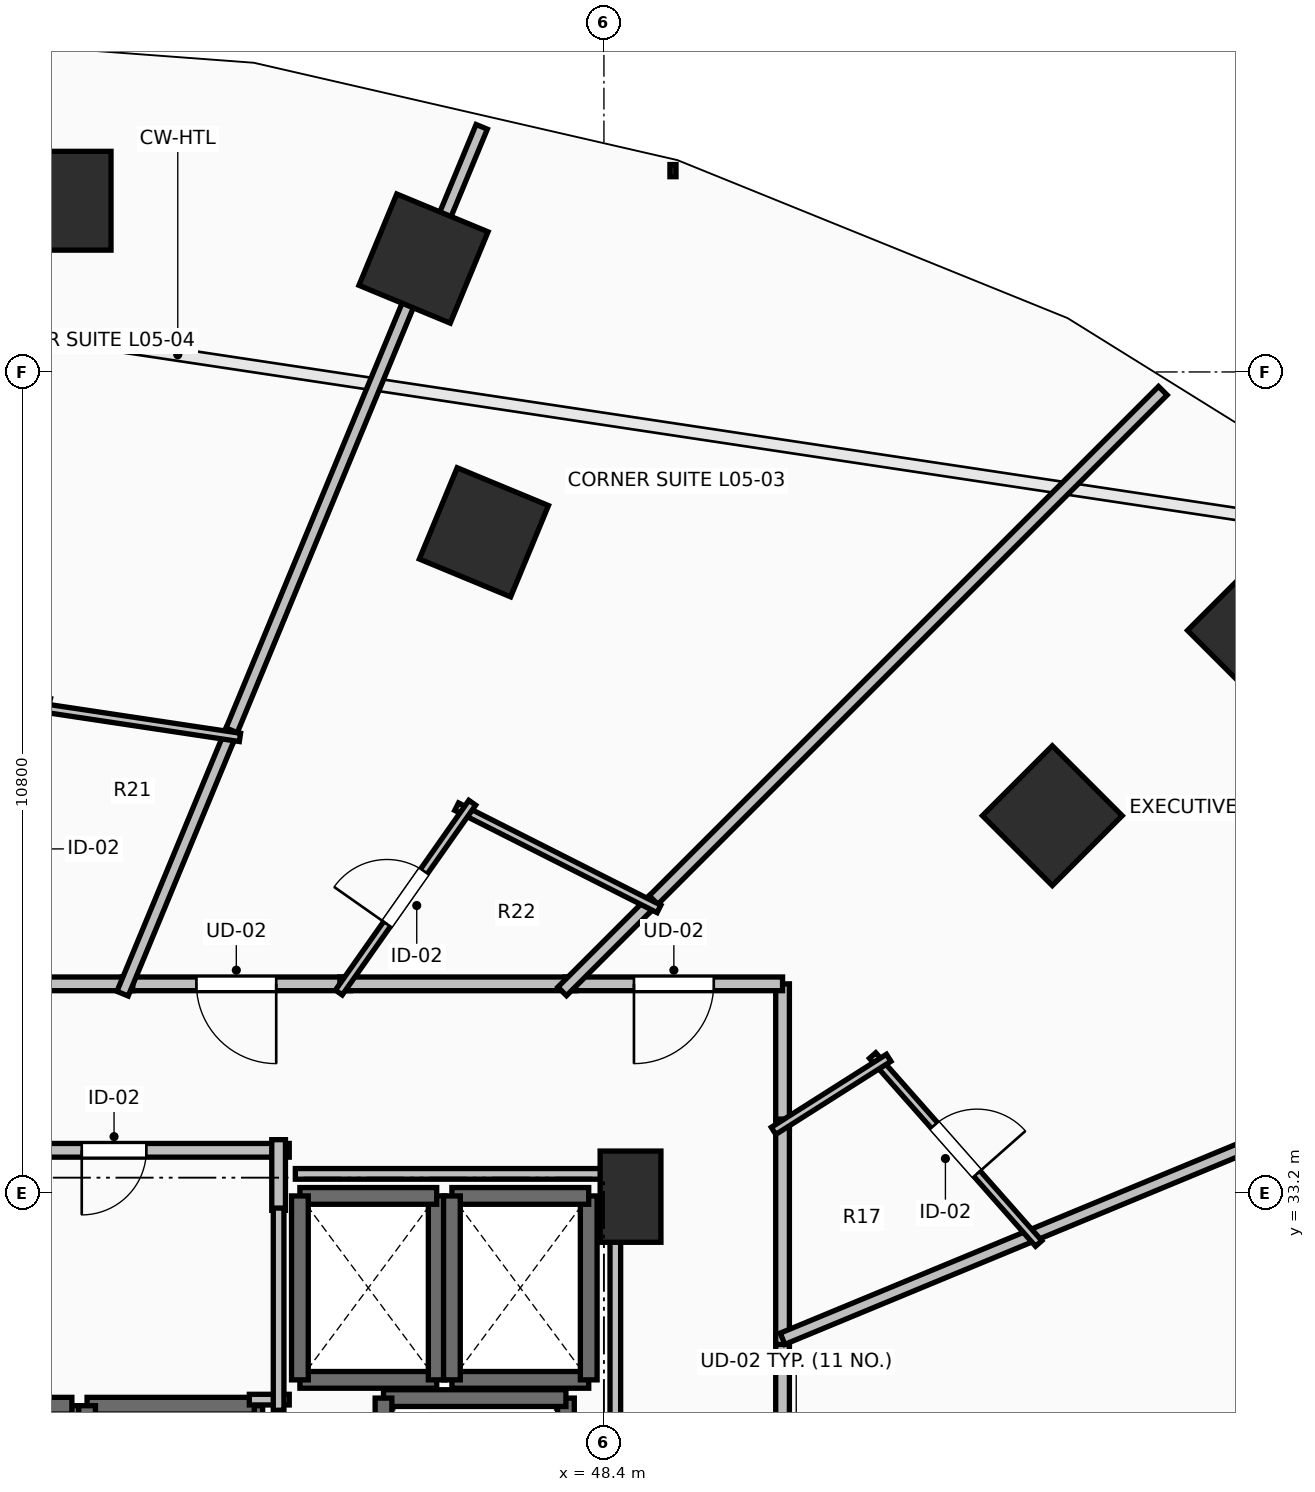
"""IFC4 building model, lengths in metres.
Left out: names, types, materials, properties, quantities, classifications, styles, units other than length and angle.
Written with IfcOpenShell. Run it as: python <this file> out.ifc"""

import sys

from ifc_helpers import new_model, si_unit, direction, frame, frame_2d, origin, origin_2d, place, context, subcontext, project, spatial, rectangle, extrude, element, fill, save


model = new_model("IFC4")
c1 = context("Model", 3, precision=1e-05, world=origin(), true_north=direction((0.0, 1.0)))
c2 = subcontext(c1, "Body", "Model", "MODEL_VIEW")
j1 = project(units=[si_unit("LENGTHUNIT", "METRE"), si_unit("PLANEANGLEUNIT", "RADIAN")], contexts=[c1])
p1 = place(None, origin())
s1 = spatial("IfcSite", under=j1, at=p1, CompositionType="ELEMENT")
p2 = place(p1, origin())
s2 = spatial("IfcBuilding", under=s1, at=p2, CompositionType="ELEMENT")
p3 = place(p2, frame((0.0, 0.0, 24.0)))
s3 = spatial("IfcBuildingStorey", under=s2, at=p3, CompositionType="ELEMENT", Elevation=24.0)
for number, where, z_axis, x_axis in (
    (1, (54.299, 38.162, 0.0), (0.0, 0.0, 1.0), (0.707, 0.707, 0.0)),
    (2, (46.821, 41.891, 0.0), (0.0, 0.0, 1.0), (0.383, 0.924, 0.0)),
    (3, (56.997, 40.6, 0.0), (0.0, 0.0, 1.0), (0.707, 0.707, 0.0)),
    (4, (46.026, 45.492, 0.0), (0.0, 0.0, 1.0), (0.383, 0.924, 0.0)),
    (5, (41.265, 46.252, 0.0), (0.0, 0.0, 1.0), (0.0, 1.0, 0.0)),
):
    element("IfcColumn", number, at=place(p3, frame(where, z_axis=z_axis, x_axis=x_axis)), inside=s3, PredefinedType="COLUMN", context=c2, shape_type="SweptSolid", body=[
        extrude(rectangle(XDim=1.3, YDim=1.3, at=origin_2d()), origin(), (0.0, 0.0, 1.0), 3.5),
    ])
p4 = place(p3, frame((48.75, 33.15, 0.0), z_axis=(0.0, 0.0, 1.0), x_axis=(1.0, 0.0, 0.0)))
e6 = element("IfcColumn", 6, at=p4, inside=s3, PredefinedType="PILASTER", context=c2, shape_type="SweptSolid", body=[
    extrude(rectangle(XDim=0.8, YDim=1.2, at=origin_2d()), origin(), (0.0, 0.0, 1.0), 3.5),
])
p5 = place(p3, frame((41.4, 27.8, 0.0), z_axis=(0.0, 0.0, 1.0), x_axis=(0.0, 1.0, 0.0)))
e7 = element("IfcWall", 7, at=p5, inside=s3, PredefinedType="SOLIDWALL", context=c2, shape_type="SweptSolid", body=[
    extrude(rectangle(XDim=2.6, YDim=0.22, at=frame_2d((1.3, 0.0))), origin(), (0.0, 0.0, 1.0), 3.24),
])
p6 = place(p3, frame((41.4, 30.4, 0.0), z_axis=(0.0, 0.0, 1.0), x_axis=(-1.0, 0.0, 0.0)))
e8 = element("IfcWall", 8, at=p6, inside=s3, PredefinedType="SOLIDWALL", context=c2, shape_type="SweptSolid", body=[
    extrude(rectangle(XDim=2.2, YDim=0.22, at=frame_2d((1.1, 0.0))), origin(), (0.0, 0.0, 1.0), 3.24),
])
p7 = place(p3, frame((43.8, 27.8, 0.0), z_axis=(0.0, 0.0, 1.0), x_axis=(0.0, 1.0, 0.0)))
e9 = element("IfcWall", 9, at=p7, inside=s3, PredefinedType="SOLIDWALL", context=c2, shape_type="SweptSolid", body=[
    extrude(rectangle(XDim=2.6, YDim=0.22, at=frame_2d((1.3, 0.0))), origin(), (0.0, 0.0, 1.0), 3.24),
])
p8 = place(p3, frame((43.8, 30.4, 0.0), z_axis=(0.0, 0.0, 1.0), x_axis=(-1.0, 0.0, 0.0)))
e10 = element("IfcWall", 10, at=p8, inside=s3, PredefinedType="SOLIDWALL", context=c2, shape_type="SweptSolid", body=[
    extrude(rectangle(XDim=2.2, YDim=0.22, at=frame_2d((1.1, 0.0))), origin(), (0.0, 0.0, 1.0), 3.24),
])
p9 = place(p3, frame((41.6, 30.4, 0.0), z_axis=(0.0, 0.0, 1.0), x_axis=(0.0, -1.0, 0.0)))
e11 = element("IfcWall", 11, at=p9, inside=s3, PredefinedType="SOLIDWALL", context=c2, shape_type="SweptSolid", body=[
    extrude(rectangle(XDim=2.6, YDim=0.22, at=frame_2d((1.3, 0.0))), origin(), (0.0, 0.0, 1.0), 3.24),
])
p10 = place(p3, frame((44.4, 30.74, 0.0), z_axis=(0.0, 0.0, 1.0), x_axis=(1.0, 0.0, 0.0)))
e12 = element("IfcWall", 12, at=p10, inside=s3, PredefinedType="SOLIDWALL", context=c2, shape_type="SweptSolid", body=[
    extrude(rectangle(XDim=1.8, YDim=0.22, at=frame_2d((0.9, 0.0))), origin(), (0.0, 0.0, 1.0), 3.24),
])
p11 = place(p3, frame((46.2, 30.74, 0.0), z_axis=(0.0, 0.0, 1.0), x_axis=(0.0, 1.0, 0.0)))
e13 = element("IfcWall", 13, at=p11, inside=s3, PredefinedType="SOLIDWALL", context=c2, shape_type="SweptSolid", body=[
    extrude(rectangle(XDim=2.42, YDim=0.22, at=frame_2d((1.21, 0.0))), origin(), (0.0, 0.0, 1.0), 3.24),
])
p12 = place(p3, frame((46.2, 33.16, 0.0), z_axis=(0.0, 0.0, 1.0), x_axis=(-1.0, 0.0, 0.0)))
e14 = element("IfcWall", 14, at=p12, inside=s3, PredefinedType="SOLIDWALL", context=c2, shape_type="SweptSolid", body=[
    extrude(rectangle(XDim=1.8, YDim=0.22, at=frame_2d((0.9, 0.0))), origin(), (0.0, 0.0, 1.0), 3.24),
])
p13 = place(p3, frame((44.4, 33.16, 0.0), z_axis=(0.0, 0.0, 1.0), x_axis=(0.0, -1.0, 0.0)))
e15 = element("IfcWall", 15, at=p13, inside=s3, PredefinedType="SOLIDWALL", context=c2, shape_type="SweptSolid", body=[
    extrude(rectangle(XDim=2.42, YDim=0.22, at=frame_2d((1.21, 0.0))), origin(), (0.0, 0.0, 1.0), 3.24),
])
p14 = place(p3, frame((46.4, 30.74, 0.0), z_axis=(0.0, 0.0, 1.0), x_axis=(1.0, 0.0, 0.0)))
e16 = element("IfcWall", 16, at=p14, inside=s3, PredefinedType="SOLIDWALL", context=c2, shape_type="SweptSolid", body=[
    extrude(rectangle(XDim=1.8, YDim=0.22, at=frame_2d((0.9, 0.0))), origin(), (0.0, 0.0, 1.0), 3.24),
])
p15 = place(p3, frame((48.2, 30.74, 0.0), z_axis=(0.0, 0.0, 1.0), x_axis=(0.0, 1.0, 0.0)))
e17 = element("IfcWall", 17, at=p15, inside=s3, PredefinedType="SOLIDWALL", context=c2, shape_type="SweptSolid", body=[
    extrude(rectangle(XDim=2.42, YDim=0.22, at=frame_2d((1.21, 0.0))), origin(), (0.0, 0.0, 1.0), 3.24),
])
p16 = place(p3, frame((48.2, 33.16, 0.0), z_axis=(0.0, 0.0, 1.0), x_axis=(-1.0, 0.0, 0.0)))
e18 = element("IfcWall", 18, at=p16, inside=s3, PredefinedType="SOLIDWALL", context=c2, shape_type="SweptSolid", body=[
    extrude(rectangle(XDim=1.8, YDim=0.22, at=frame_2d((0.9, 0.0))), origin(), (0.0, 0.0, 1.0), 3.24),
])
p17 = place(p3, frame((46.4, 33.16, 0.0), z_axis=(0.0, 0.0, 1.0), x_axis=(0.0, -1.0, 0.0)))
e19 = element("IfcWall", 19, at=p17, inside=s3, PredefinedType="SOLIDWALL", context=c2, shape_type="SweptSolid", body=[
    extrude(rectangle(XDim=2.42, YDim=0.22, at=frame_2d((1.21, 0.0))), origin(), (0.0, 0.0, 1.0), 3.24),
])
p18 = place(p3, frame((47.9, 28.0, 0.0), z_axis=(0.0, 0.0, 1.0), x_axis=(0.0, 1.0, 0.0)))
e20 = element("IfcWall", 20, at=p18, inside=s3, PredefinedType="SHEAR", context=c2, shape_type="SweptSolid", body=[
    extrude(rectangle(XDim=2.5, YDim=0.22, at=frame_2d((1.25, 0.0))), origin(), (0.0, 0.0, 1.0), 3.24),
])
p19 = place(p3, frame((47.9, 30.5, 0.0), z_axis=(0.0, 0.0, 1.0), x_axis=(-1.0, 0.0, 0.0)))
e21 = element("IfcWall", 21, at=p19, inside=s3, PredefinedType="SHEAR", context=c2, shape_type="SweptSolid", body=[
    extrude(rectangle(XDim=2.4, YDim=0.22, at=frame_2d((1.2, 0.0))), origin(), (0.0, 0.0, 1.0), 3.24),
])
p20 = place(p3, frame((45.5, 30.5, 0.0), z_axis=(0.0, 0.0, 1.0), x_axis=(0.0, -1.0, 0.0)))
e22 = element("IfcWall", 22, at=p20, inside=s3, PredefinedType="SHEAR", context=c2, shape_type="SweptSolid", body=[
    extrude(rectangle(XDim=2.5, YDim=0.22, at=frame_2d((1.25, 0.0))), origin(), (0.0, 0.0, 1.0), 3.24),
])
p21 = place(p3, frame((44.26, 33.76, 0.0), z_axis=(0.0, 0.0, 1.0), x_axis=(-1.0, 0.0, 0.0)))
e23 = element("IfcWall", 23, at=p21, inside=s3, PredefinedType="PARTITIONING", context=c2, shape_type="SweptSolid", body=[
    extrude(rectangle(XDim=4.61, YDim=0.18, at=frame_2d((2.305, 0.0))), origin(), (0.0, 0.0, 1.0), 3.24),
])
p22 = place(p21, frame((1.88, 0.0, 0.0)))
e24 = element("IfcOpeningElement", 24, at=p22, cuts=e23, PredefinedType="OPENING", context=c2, shape_type="SweptSolid", body=[
    extrude(rectangle(XDim=0.85, YDim=2.1, at=frame_2d((0.425, 1.05))), frame((0.0, 0.105, 0.0), z_axis=(0.0, -1.0, 0.0), x_axis=(1.0, 0.0, 0.0)), (0.0, 0.0, 1.0), 0.21),
])
p23 = place(p3, frame((44.12, 32.97, 0.0), z_axis=(0.0, 0.0, 1.0), x_axis=(0.0, 1.0, 0.0)))
e25 = element("IfcWall", 25, at=p23, inside=s3, PredefinedType="PARTITIONING", context=c2, shape_type="SweptSolid", body=[
    extrude(rectangle(XDim=0.93, YDim=0.18, at=frame_2d((0.465, 0.0))), origin(), (0.0, 0.0, 1.0), 3.24),
])
p24 = place(p3, frame((50.75, 28.165, 0.0), z_axis=(0.0, 0.0, 1.0), x_axis=(0.0, 1.0, 0.0)))
e26 = element("IfcWall", 26, at=p24, inside=s3, PredefinedType="PARTITIONING", context=c2, shape_type="SweptSolid", body=[
    extrude(rectangle(XDim=3.181, YDim=0.18, at=frame_2d((1.59, 0.0))), origin(), (0.0, 0.0, 1.0), 3.24),
])
p25 = place(p24, frame((1.065, 0.0, 0.0)))
e27 = element("IfcOpeningElement", 27, at=p25, cuts=e26, PredefinedType="OPENING", context=c2, shape_type="SweptSolid", body=[
    extrude(rectangle(XDim=1.05, YDim=2.2, at=frame_2d((0.525, 1.1))), frame((0.0, 0.105, 0.0), z_axis=(0.0, -1.0, 0.0), x_axis=(1.0, 0.0, 0.0)), (0.0, 0.0, 1.0), 0.21),
])
p26 = place(p3, frame((50.75, 34.031, 0.0), z_axis=(0.0, 0.0, 1.0), x_axis=(0.0, 1.0, 0.0)))
e28 = element("IfcWall", 28, at=p26, inside=s3, PredefinedType="PARTITIONING", context=c2, shape_type="SweptSolid", body=[
    extrude(rectangle(XDim=1.919, YDim=0.18, at=frame_2d((0.959, 0.0))), origin(), (0.0, 0.0, 1.0), 2.432),
])
p27 = place(p3, frame((50.75, 35.95, 0.0), z_axis=(0.0, 0.0, 1.0), x_axis=(-1.0, 0.0, 0.0)))
e29 = element("IfcWall", 29, at=p27, inside=s3, PredefinedType="PARTITIONING", context=c2, shape_type="SweptSolid", body=[
    extrude(rectangle(XDim=2.86, YDim=0.18, at=frame_2d((1.43, 0.0))), origin(), (0.0, 0.0, 1.0), 2.432),
])
p28 = place(p27, frame((0.905, 0.0, 0.0)))
e30 = element("IfcOpeningElement", 30, at=p28, cuts=e29, PredefinedType="OPENING", context=c2, shape_type="SweptSolid", body=[
    extrude(rectangle(XDim=1.05, YDim=2.2, at=frame_2d((0.525, 1.1))), frame((0.0, 0.105, 0.0), z_axis=(0.0, -1.0, 0.0), x_axis=(1.0, 0.0, 0.0)), (0.0, 0.0, 1.0), 0.21),
])
p29 = place(p3, frame((50.75, 31.206, 0.0), z_axis=(0.0, 0.0, 1.0), x_axis=(0.0, 1.0, 0.0)))
e31 = element("IfcWall", 31, at=p29, inside=s3, PredefinedType="PARTITIONING", context=c2, shape_type="SweptSolid", body=[
    extrude(rectangle(XDim=2.965, YDim=0.18, at=frame_2d((1.482, 0.0))), origin(), (0.0, 0.0, 1.0), 2.432),
])
p30 = place(p3, frame((45.066, 35.95, 0.0), z_axis=(0.0, 0.0, 1.0), x_axis=(-1.0, 0.0, 0.0)))
e32 = element("IfcWall", 32, at=p30, inside=s3, PredefinedType="PARTITIONING", context=c2, shape_type="SweptSolid", body=[
    extrude(rectangle(XDim=3.005, YDim=0.18, at=frame_2d((1.502, 0.0))), origin(), (0.0, 0.0, 1.0), 3.24),
])
p31 = place(p30, frame((0.978, 0.0, 0.0)))
e33 = element("IfcOpeningElement", 33, at=p31, cuts=e32, PredefinedType="OPENING", context=c2, shape_type="SweptSolid", body=[
    extrude(rectangle(XDim=1.05, YDim=2.2, at=frame_2d((0.525, 1.1))), frame((0.0, 0.105, 0.0), z_axis=(0.0, -1.0, 0.0), x_axis=(1.0, 0.0, 0.0)), (0.0, 0.0, 1.0), 0.21),
])
p32 = place(p3, frame((48.03, 35.95, 0.0), z_axis=(0.0, 0.0, 1.0), x_axis=(-1.0, 0.0, 0.0)))
e34 = element("IfcWall", 34, at=p32, inside=s3, PredefinedType="PARTITIONING", context=c2, shape_type="SweptSolid", body=[
    extrude(rectangle(XDim=3.104, YDim=0.18, at=frame_2d((1.552, 0.0))), origin(), (0.0, 0.0, 1.0), 2.432),
])
p33 = place(p3, frame((42.201, 35.95, 0.0), z_axis=(0.0, 0.0, 1.0), x_axis=(-1.0, 0.0, 0.0)))
e35 = element("IfcWall", 35, at=p33, inside=s3, PredefinedType="PARTITIONING", context=c2, shape_type="SweptSolid", body=[
    extrude(rectangle(XDim=2.056, YDim=0.18, at=frame_2d((1.028, 0.0))), origin(), (0.0, 0.0, 1.0), 3.24),
])
p34 = place(p3, frame((63.793, 36.684, 0.0), z_axis=(0.0, 0.0, 1.0), x_axis=(-0.923866969846, -0.382713759914, 0.0)))
e36 = element("IfcWall", 36, at=p34, inside=s3, PredefinedType="PARTITIONING", context=c2, shape_type="SweptSolid", body=[
    extrude(rectangle(XDim=14.118, YDim=0.16, at=frame_2d((7.059, 0.0))), origin(), (0.0, 0.0, 1.0), 2.432),
])
p35 = place(p3, frame((51.935, 35.007, 0.0), z_axis=(0.0, 0.0, 1.0), x_axis=(0.662059609276, -0.749451181709, 0.0)))
e37 = element("IfcWall", 37, at=p35, inside=s3, PredefinedType="PARTITIONING", context=c2, shape_type="SweptSolid", body=[
    extrude(rectangle(XDim=3.299, YDim=0.11, at=frame_2d((1.65, 0.0))), origin(), (0.0, 0.0, 1.0), 2.432),
])
p36 = place(p35, frame((1.225, 0.0, 0.0)))
e38 = element("IfcOpeningElement", 38, at=p36, cuts=e37, PredefinedType="OPENING", context=c2, shape_type="SweptSolid", body=[
    extrude(rectangle(XDim=0.85, YDim=2.1, at=frame_2d((0.425, 1.05))), frame((0.0, 0.07, 0.0), z_axis=(0.0, -1.0, 0.0), x_axis=(1.0, 0.0, 0.0)), (0.0, 0.0, 1.0), 0.14),
])
p37 = place(p3, frame((50.632, 34.016, 0.0), z_axis=(0.0, 0.0, 1.0), x_axis=(0.844361394482, 0.535774052665, 0.0)))
e39 = element("IfcWall", 39, at=p37, inside=s3, PredefinedType="PARTITIONING", context=c2, shape_type="SweptSolid", body=[
    extrude(rectangle(XDim=1.793, YDim=0.11, at=frame_2d((0.897, 0.0))), origin(), (0.0, 0.0, 1.0), 2.922),
])
p38 = place(p3, frame((55.753, 43.753, 0.0), z_axis=(0.0, 0.0, 1.0), x_axis=(-0.707106781187, -0.707106781187, 0.0)))
e40 = element("IfcWall", 40, at=p38, inside=s3, PredefinedType="PARTITIONING", context=c2, shape_type="SweptSolid", body=[
    extrude(rectangle(XDim=9.615, YDim=0.16, at=frame_2d((4.808, 0.0))), origin(), (0.0, 0.0, 1.0), 2.624),
])
p39 = place(p3, frame((49.053, 37.053, 0.0), z_axis=(0.0, 0.0, 1.0), x_axis=(-0.707106781187, -0.707106781187, 0.0)))
e41 = element("IfcWall", 41, at=p39, inside=s3, PredefinedType="PARTITIONING", context=c2, shape_type="SweptSolid", body=[
    extrude(rectangle(XDim=1.7, YDim=0.16, at=frame_2d((0.85, 0.0))), origin(), (0.0, 0.0, 1.0), 2.432),
])
p40 = place(p3, frame((46.462, 38.281, 0.0), z_axis=(0.0, 0.0, 1.0), x_axis=(0.892486842203, -0.451073426944, 0.0)))
e42 = element("IfcWall", 42, at=p40, inside=s3, PredefinedType="PARTITIONING", context=c2, shape_type="SweptSolid", body=[
    extrude(rectangle(XDim=2.982, YDim=0.11, at=frame_2d((1.491, 0.0))), origin(), (0.0, 0.0, 1.0), 2.432),
])
p41 = place(p3, frame((44.913, 35.835, 0.0), z_axis=(0.0, 0.0, 1.0), x_axis=(0.574986040322, 0.818163219312, 0.0)))
e43 = element("IfcWall", 43, at=p41, inside=s3, PredefinedType="PARTITIONING", context=c2, shape_type="SweptSolid", body=[
    extrude(rectangle(XDim=3.052, YDim=0.11, at=frame_2d((1.526, 0.0))), origin(), (0.0, 0.0, 1.0), 2.922),
])
p42 = place(p41, frame((1.101, 0.0, 0.0)))
e44 = element("IfcOpeningElement", 44, at=p42, cuts=e43, PredefinedType="OPENING", context=c2, shape_type="SweptSolid", body=[
    extrude(rectangle(XDim=0.85, YDim=2.1, at=frame_2d((0.425, 1.05))), frame((0.0, 0.07, 0.0), z_axis=(0.0, -1.0, 0.0), x_axis=(1.0, 0.0, 0.0)), (0.0, 0.0, 1.0), 0.14),
])
p43 = place(p3, frame((46.792, 47.225, 0.0), z_axis=(0.0, 0.0, 1.0), x_axis=(-0.382750893248, -0.923851586413, 0.0)))
e45 = element("IfcWall", 45, at=p43, inside=s3, PredefinedType="PARTITIONING", context=c2, shape_type="SweptSolid", body=[
    extrude(rectangle(XDim=8.734, YDim=0.16, at=frame_2d((4.367, 0.0))), origin(), (0.0, 0.0, 1.0), 2.874),
])
p44 = place(p3, frame((43.503, 39.285, 0.0), z_axis=(0.0, 0.0, 1.0), x_axis=(-0.382867331148, -0.923803337697, 0.0)))
e46 = element("IfcWall", 46, at=p44, inside=s3, PredefinedType="PARTITIONING", context=c2, shape_type="SweptSolid", body=[
    extrude(rectangle(XDim=3.75, YDim=0.16, at=frame_2d((1.875, 0.0))), origin(), (0.0, 0.0, 1.0), 2.922),
])
p45 = place(p3, frame((40.896, 39.6, 0.0), z_axis=(0.0, 0.0, 1.0), x_axis=(0.98891024541, -0.148514398367, 0.0)))
e47 = element("IfcWall", 47, at=p45, inside=s3, PredefinedType="PARTITIONING", context=c2, shape_type="SweptSolid", body=[
    extrude(rectangle(XDim=2.745, YDim=0.11, at=frame_2d((1.373, 0.0))), origin(), (0.0, 0.0, 1.0), 3.24),
])
p46 = place(p3, frame((43.735, 30.48, 0.0), z_axis=(0.0, 0.0, 1.0), x_axis=(1.0, 0.0, 0.0)))
e48 = element("IfcWall", 48, at=p46, inside=s3, PredefinedType="PARTITIONING", context=c2, shape_type="SweptSolid", body=[
    extrude(rectangle(XDim=0.525, YDim=0.14, at=frame_2d((0.262, 0.0))), origin(), (0.0, 0.0, 1.0), 3.24),
])
p47 = place(p3, frame((44.12, 30.34, 0.0), z_axis=(0.0, 0.0, 1.0), x_axis=(0.0, 1.0, 0.0)))
e49 = element("IfcWall", 49, at=p47, inside=s3, PredefinedType="PARTITIONING", context=c2, shape_type="SweptSolid", body=[
    extrude(rectangle(XDim=2.66, YDim=0.14, at=frame_2d((1.33, 0.0))), origin(), (0.0, 0.0, 1.0), 3.24),
])
p48 = place(p3, frame((44.34, 33.45, 0.0), z_axis=(0.0, 0.0, 1.0), x_axis=(1.0, 0.0, 0.0)))
e50 = element("IfcWall", 50, at=p48, inside=s3, PredefinedType="PARTITIONING", context=c2, shape_type="SweptSolid", body=[
    extrude(rectangle(XDim=4.21, YDim=0.14, at=frame_2d((2.105, 0.0))), origin(), (0.0, 0.0, 1.0), 2.432),
])
p49 = place(p3, frame((48.55, 33.45, 0.0), z_axis=(0.0, 0.0, 1.0), x_axis=(0.0, -1.0, 0.0)))
e51 = element("IfcWall", 51, at=p49, inside=s3, PredefinedType="PARTITIONING", context=c2, shape_type="SweptSolid", body=[
    extrude(rectangle(XDim=5.254, YDim=0.14, at=frame_2d((2.627, 0.0))), origin(), (0.0, 0.0, 1.0), 2.432),
])
p50 = place(p22, origin())
e52 = element("IfcDoor", 52, at=p50, inside=s3, OperationType="SINGLE_SWING_RIGHT", PredefinedType="DOOR", context=c2, shape_type="SweptSolid", body=[
    extrude(rectangle(XDim=0.85, YDim=2.1, at=frame_2d((0.425, 1.05))), frame((0.0, 0.025, 0.0), z_axis=(0.0, -1.0, 0.0), x_axis=(1.0, 0.0, 0.0)), (0.0, 0.0, 1.0), 0.05),
])
fill(e24, e52)
p51 = place(p28, origin())
e53 = element("IfcDoor", 53, at=p51, inside=s3, OperationType="SINGLE_SWING_RIGHT", PredefinedType="DOOR", context=c2, shape_type="SweptSolid", body=[
    extrude(rectangle(XDim=1.05, YDim=2.2, at=frame_2d((0.525, 1.1))), frame((0.0, 0.025, 0.0), z_axis=(0.0, -1.0, 0.0), x_axis=(1.0, 0.0, 0.0)), (0.0, 0.0, 1.0), 0.05),
])
fill(e30, e53)
p52 = place(p31, origin())
e54 = element("IfcDoor", 54, at=p52, inside=s3, OperationType="SINGLE_SWING_LEFT", PredefinedType="DOOR", context=c2, shape_type="SweptSolid", body=[
    extrude(rectangle(XDim=1.05, YDim=2.2, at=frame_2d((0.525, 1.1))), frame((0.0, 0.025, 0.0), z_axis=(0.0, -1.0, 0.0), x_axis=(1.0, 0.0, 0.0)), (0.0, 0.0, 1.0), 0.05),
])
fill(e33, e54)
p53 = place(p36, origin())
e55 = element("IfcDoor", 55, at=p53, inside=s3, OperationType="SINGLE_SWING_RIGHT", PredefinedType="DOOR", context=c2, shape_type="SweptSolid", body=[
    extrude(rectangle(XDim=0.85, YDim=2.1, at=frame_2d((0.425, 1.05))), frame((0.0, 0.025, 0.0), z_axis=(0.0, -1.0, 0.0), x_axis=(1.0, 0.0, 0.0)), (0.0, 0.0, 1.0), 0.05),
])
fill(e38, e55)
p54 = place(p42, origin())
e56 = element("IfcDoor", 56, at=p54, inside=s3, OperationType="SINGLE_SWING_LEFT", PredefinedType="DOOR", context=c2, shape_type="SweptSolid", body=[
    extrude(rectangle(XDim=0.85, YDim=2.1, at=frame_2d((0.425, 1.05))), frame((0.0, 0.025, 0.0), z_axis=(0.0, -1.0, 0.0), x_axis=(1.0, 0.0, 0.0)), (0.0, 0.0, 1.0), 0.05),
])
fill(e44, e56)
save(model, sys.argv[1])
